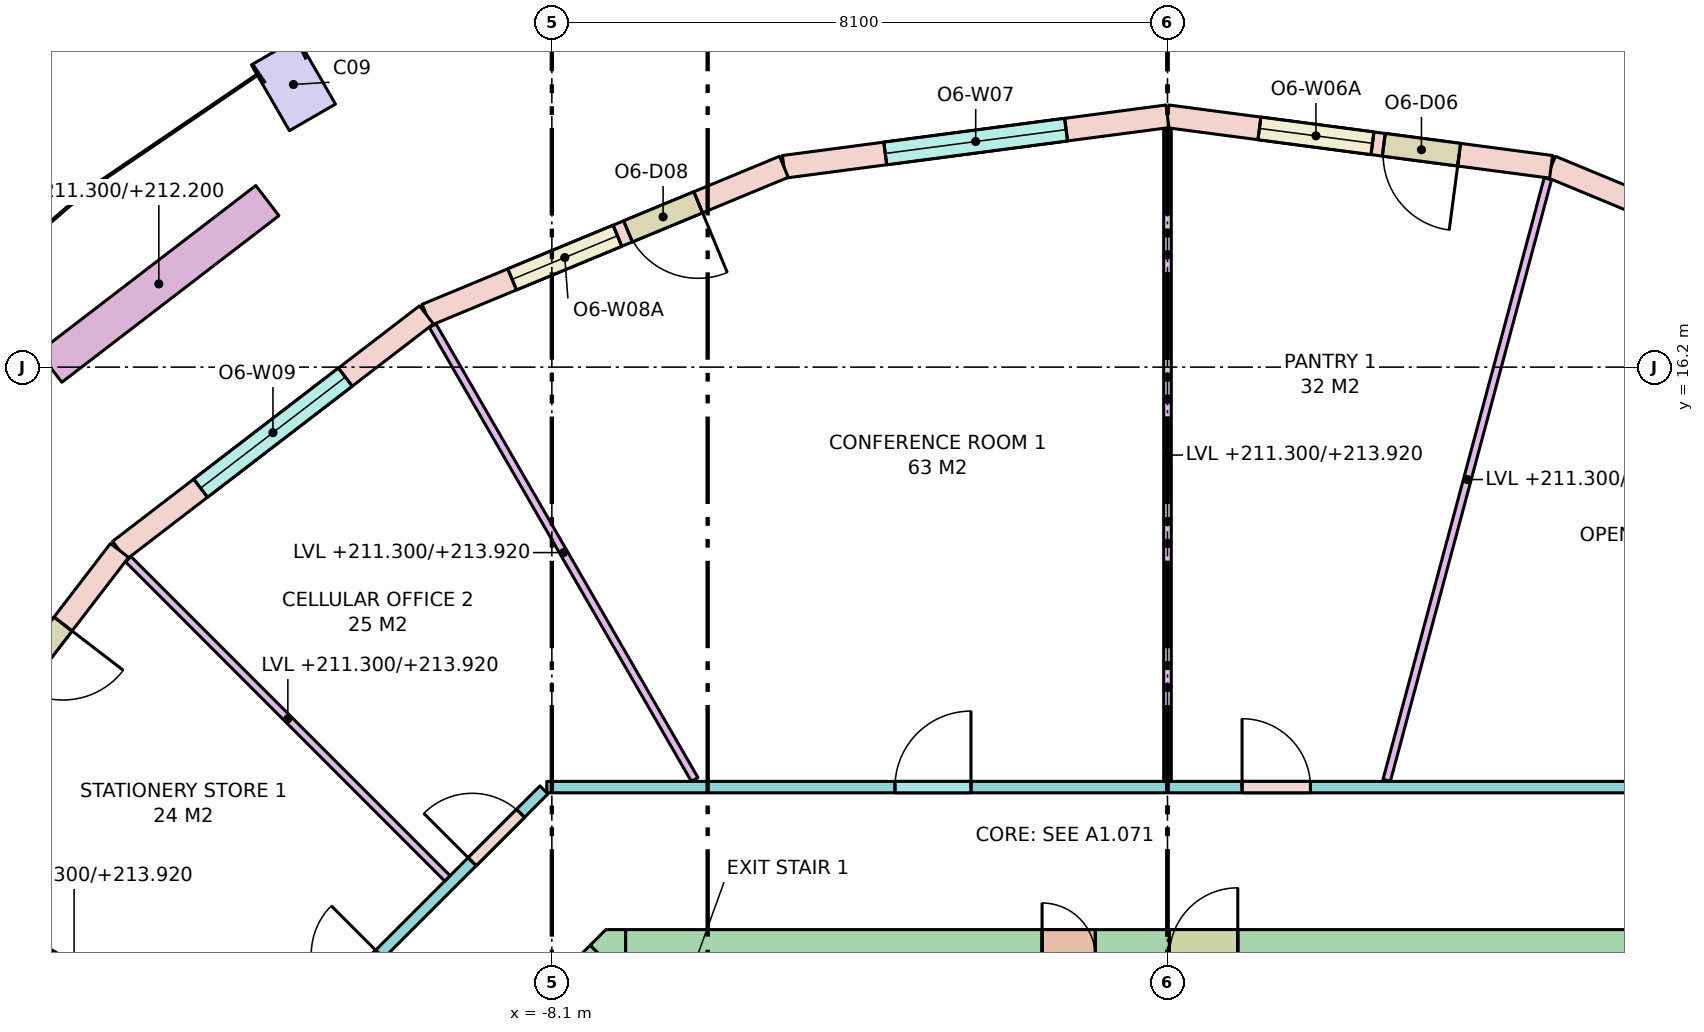
"""IFC4 building model, lengths in metres.
Left out: names, types, materials, properties, quantities, classifications, styles, units other than length and angle.
Written with IfcOpenShell. Run it as: python <this file> out.ifc"""

import sys

from ifc_helpers import new_model, si_unit, direction, frame, frame_2d, origin, origin_2d, place, context, subcontext, project, spatial, polyline, rectangle, outline, extrude, element, fill, save


model = new_model("IFC4")
c1 = context("Model", 3, precision=1e-05, world=origin(), true_north=direction((0.0, 1.0)))
c2 = subcontext(c1, "Body", "Model", "MODEL_VIEW")
j1 = project(units=[si_unit("LENGTHUNIT", "METRE"), si_unit("PLANEANGLEUNIT", "RADIAN")], contexts=[c1])
p1 = place(None, origin())
s1 = spatial("IfcSite", under=j1, at=p1, CompositionType="ELEMENT")
p2 = place(p1, origin())
s2 = spatial("IfcBuilding", under=s1, at=p2, CompositionType="ELEMENT")
p3 = place(p2, frame((0.0, 0.0, 211.3)))
s3 = spatial("IfcBuildingStorey", under=s2, at=p3, CompositionType="ELEMENT", Elevation=211.3)
p4 = place(p3, frame((-11.5, 19.919, 0.0), z_axis=(0.0, 0.0, 1.0), x_axis=(-0.866025403784, -0.5, 0.0)))
e1 = element("IfcColumn", 1, at=p4, inside=s3, PredefinedType="COLUMN", context=c2, shape_type="SweptSolid", body=[
    extrude(rectangle(XDim=0.7, YDim=1.0, at=origin_2d()), origin(), (0.0, 0.0, 1.0), 3.7),
])
p5 = place(p3, frame((-7.13, 8.45, -0.28), z_axis=(0.0, 0.0, 1.0), x_axis=(1.0, 0.0, 0.0)))
e2 = element("IfcWall", 2, at=p5, inside=s3, PredefinedType="SHEAR", context=c2, shape_type="SweptSolid", body=[
    extrude(rectangle(XDim=14.26, YDim=0.7, at=frame_2d((7.13, 0.0))), origin(), (0.0, 0.0, 1.0), 3.7),
])
p6 = place(p5, frame((5.48, 0.0, 0.28)))
e3 = element("IfcOpeningElement", 3, at=p6, cuts=e2, PredefinedType="OPENING", context=c2, shape_type="SweptSolid", body=[
    extrude(rectangle(XDim=0.7, YDim=2.1, at=frame_2d((0.35, 1.05))), frame((0.0, 0.36, 0.0), z_axis=(0.0, -1.0, 0.0), x_axis=(1.0, 0.0, 0.0)), (0.0, 0.0, 1.0), 0.72),
])
p7 = place(p5, frame((7.155, 0.0, 0.28)))
e4 = element("IfcOpeningElement", 4, at=p7, cuts=e2, PredefinedType="OPENING", context=c2, shape_type="SweptSolid", body=[
    extrude(rectangle(XDim=0.9, YDim=2.1, at=frame_2d((0.45, 1.05))), frame((0.0, 0.36, 0.0), z_axis=(0.0, -1.0, 0.0), x_axis=(1.0, 0.0, 0.0)), (0.0, 0.0, 1.0), 0.72),
])
p8 = place(p3, frame((-10.347, 5.347, -0.28), z_axis=(0.0, 0.0, 1.0), x_axis=(0.707106781187, 0.707106781187, 0.0)))
e5 = element("IfcWall", 5, at=p8, inside=s3, PredefinedType="SHEAR", context=c2, shape_type="SweptSolid", body=[
    extrude(rectangle(XDim=4.243, YDim=0.7, at=frame_2d((2.121, 0.0))), origin(), (0.0, 0.0, 1.0), 3.7),
])
p9 = place(p8, frame((0.65, 0.0, 0.28)))
e6 = element("IfcOpeningElement", 6, at=p9, cuts=e5, PredefinedType="OPENING", context=c2, shape_type="SweptSolid", body=[
    extrude(rectangle(XDim=1.2, YDim=2.1, at=frame_2d((0.6, 1.05))), frame((0.0, 0.36, 0.0), z_axis=(0.0, -1.0, 0.0), x_axis=(1.0, 0.0, 0.0)), (0.0, 0.0, 1.0), 0.72),
])
p10 = place(p3, frame((0.0, 0.0, -0.28)))
e7 = element("IfcWall", 7, at=p10, inside=s3, PredefinedType="SHEAR", context=c2, shape_type="SweptSolid", body=[
    extrude(outline(polyline([(-7.39, 8.8), (-7.13, 8.8), (-7.13, 8.8), (-7.13, 8.13), (-7.595, 8.595), (-7.595, 8.595), (-7.595, 8.595), (-7.39, 8.8)])), origin(), (0.0, 0.0, 1.0), 3.7),
])
p11 = place(p3, frame((9.75, 16.887, 0.0), z_axis=(0.0, 0.0, 1.0), x_axis=(-0.923862504675, 0.382724538613, 0.0)))
e8 = element("IfcWall", 8, at=p11, inside=s3, PredefinedType="STANDARD", context=c2, shape_type="SweptSolid", body=[
    extrude(rectangle(XDim=5.091, YDim=0.3, at=frame_2d((2.545, 0.0))), origin(), (0.0, 0.0, 1.0), 3.42),
])
p12 = place(p11, frame((1.345, 0.0, 0.8)))
e9 = element("IfcOpeningElement", 9, at=p12, cuts=e8, PredefinedType="OPENING", context=c2, shape_type="SweptSolid", body=[
    extrude(rectangle(XDim=2.4, YDim=2.4, at=frame_2d((1.2, 1.2))), frame((0.0, 0.16, 0.0), z_axis=(0.0, -1.0, 0.0), x_axis=(1.0, 0.0, 0.0)), (0.0, 0.0, 1.0), 0.32),
])
p13 = place(p3, frame((5.047, 18.836, 0.0), z_axis=(0.0, 0.0, 1.0), x_axis=(-0.99144890792, 0.130495451964, 0.0)))
e10 = element("IfcWall", 10, at=p13, inside=s3, PredefinedType="STANDARD", context=c2, shape_type="SweptSolid", body=[
    extrude(rectangle(XDim=5.091, YDim=0.3, at=frame_2d((2.545, 0.0))), origin(), (0.0, 0.0, 1.0), 3.42),
])
p14 = place(p13, frame((1.22, 0.0, 0.0)))
e11 = element("IfcOpeningElement", 11, at=p14, cuts=e10, PredefinedType="OPENING", context=c2, shape_type="SweptSolid", body=[
    extrude(rectangle(XDim=1.0, YDim=2.4, at=frame_2d((0.5, 1.2))), frame((0.0, 0.16, 0.0), z_axis=(0.0, -1.0, 0.0), x_axis=(1.0, 0.0, 0.0)), (0.0, 0.0, 1.0), 0.32),
])
p15 = place(p13, frame((2.37, 0.0, 0.8)))
e12 = element("IfcOpeningElement", 12, at=p15, cuts=e10, PredefinedType="OPENING", context=c2, shape_type="SweptSolid", body=[
    extrude(rectangle(XDim=1.5, YDim=2.4, at=frame_2d((0.75, 1.2))), frame((0.0, 0.16, 0.0), z_axis=(0.0, -1.0, 0.0), x_axis=(1.0, 0.0, 0.0)), (0.0, 0.0, 1.0), 0.32),
])
p16 = place(p3, frame((0.0, 19.5, 0.0), z_axis=(0.0, 0.0, 1.0), x_axis=(-0.99144890792, -0.130495451964, 0.0)))
e13 = element("IfcWall", 13, at=p16, inside=s3, PredefinedType="STANDARD", context=c2, shape_type="SweptSolid", body=[
    extrude(rectangle(XDim=5.091, YDim=0.3, at=frame_2d((2.545, 0.0))), origin(), (0.0, 0.0, 1.0), 3.42),
])
p17 = place(p16, frame((1.345, 0.0, 0.8)))
e14 = element("IfcOpeningElement", 14, at=p17, cuts=e13, PredefinedType="OPENING", context=c2, shape_type="SweptSolid", body=[
    extrude(rectangle(XDim=2.4, YDim=2.4, at=frame_2d((1.2, 1.2))), frame((0.0, 0.16, 0.0), z_axis=(0.0, -1.0, 0.0), x_axis=(1.0, 0.0, 0.0)), (0.0, 0.0, 1.0), 0.32),
])
p18 = place(p3, frame((-5.047, 18.836, 0.0), z_axis=(0.0, 0.0, 1.0), x_axis=(-0.923862504675, -0.382724538613, 0.0)))
e15 = element("IfcWall", 15, at=p18, inside=s3, PredefinedType="STANDARD", context=c2, shape_type="SweptSolid", body=[
    extrude(rectangle(XDim=5.091, YDim=0.3, at=frame_2d((2.545, 0.0))), origin(), (0.0, 0.0, 1.0), 3.42),
])
p19 = place(p18, frame((1.22, 0.0, 0.0)))
e16 = element("IfcOpeningElement", 16, at=p19, cuts=e15, PredefinedType="OPENING", context=c2, shape_type="SweptSolid", body=[
    extrude(rectangle(XDim=1.0, YDim=2.4, at=frame_2d((0.5, 1.2))), frame((0.0, 0.16, 0.0), z_axis=(0.0, -1.0, 0.0), x_axis=(1.0, 0.0, 0.0)), (0.0, 0.0, 1.0), 0.32),
])
p20 = place(p18, frame((2.37, 0.0, 0.8)))
e17 = element("IfcOpeningElement", 17, at=p20, cuts=e15, PredefinedType="OPENING", context=c2, shape_type="SweptSolid", body=[
    extrude(rectangle(XDim=1.5, YDim=2.4, at=frame_2d((0.75, 1.2))), frame((0.0, 0.16, 0.0), z_axis=(0.0, -1.0, 0.0), x_axis=(1.0, 0.0, 0.0)), (0.0, 0.0, 1.0), 0.32),
])
p21 = place(p3, frame((-9.75, 16.887, 0.0), z_axis=(0.0, 0.0, 1.0), x_axis=(-0.79335619014, -0.608757714995, 0.0)))
e18 = element("IfcWall", 18, at=p21, inside=s3, PredefinedType="STANDARD", context=c2, shape_type="SweptSolid", body=[
    extrude(rectangle(XDim=5.091, YDim=0.3, at=frame_2d((2.545, 0.0))), origin(), (0.0, 0.0, 1.0), 3.42),
])
p22 = place(p21, frame((1.345, 0.0, 0.8)))
e19 = element("IfcOpeningElement", 19, at=p22, cuts=e18, PredefinedType="OPENING", context=c2, shape_type="SweptSolid", body=[
    extrude(rectangle(XDim=2.4, YDim=2.4, at=frame_2d((1.2, 1.2))), frame((0.0, 0.16, 0.0), z_axis=(0.0, -1.0, 0.0), x_axis=(1.0, 0.0, 0.0)), (0.0, 0.0, 1.0), 0.32),
])
p23 = place(p3, frame((-13.789, 13.789, 0.0), z_axis=(0.0, 0.0, 1.0), x_axis=(-0.608757714995, -0.79335619014, 0.0)))
e20 = element("IfcWall", 20, at=p23, inside=s3, PredefinedType="STANDARD", context=c2, shape_type="SweptSolid", body=[
    extrude(rectangle(XDim=5.091, YDim=0.3, at=frame_2d((2.545, 0.0))), origin(), (0.0, 0.0, 1.0), 3.42),
])
p24 = place(p23, frame((1.22, 0.0, 0.0)))
e21 = element("IfcOpeningElement", 21, at=p24, cuts=e20, PredefinedType="OPENING", context=c2, shape_type="SweptSolid", body=[
    extrude(rectangle(XDim=1.0, YDim=2.4, at=frame_2d((0.5, 1.2))), frame((0.0, 0.16, 0.0), z_axis=(0.0, -1.0, 0.0), x_axis=(1.0, 0.0, 0.0)), (0.0, 0.0, 1.0), 0.32),
])
p25 = place(p23, frame((2.37, 0.0, 0.8)))
e22 = element("IfcOpeningElement", 22, at=p25, cuts=e20, PredefinedType="OPENING", context=c2, shape_type="SweptSolid", body=[
    extrude(rectangle(XDim=1.5, YDim=2.4, at=frame_2d((0.75, 1.2))), frame((0.0, 0.16, 0.0), z_axis=(0.0, -1.0, 0.0), x_axis=(1.0, 0.0, 0.0)), (0.0, 0.0, 1.0), 0.32),
])
p26 = place(p3, frame((-11.843, 18.391, 0.0), z_axis=(0.0, 0.0, 1.0), x_axis=(-0.793326845617, -0.608795955984, 0.0)))
e23 = element("IfcWall", 23, at=p26, inside=s3, PredefinedType="PARAPET", context=c2, shape_type="SweptSolid", body=[
    extrude(rectangle(XDim=3.6, YDim=0.5, at=frame_2d((1.8, 0.0))), origin(), (0.0, 0.0, 1.0), 0.9),
])
p27 = place(p3, frame((-12.638, 6.204, 0.0), z_axis=(0.0, 0.0, 1.0), x_axis=(0.707106781187, 0.707106781187, 0.0)))
e24 = element("IfcWall", 24, at=p27, inside=s3, PredefinedType="PARTITIONING", context=c2, shape_type="SweptSolid", body=[
    extrude(rectangle(XDim=6.271, YDim=0.15, at=frame_2d((3.135, 0.0))), origin(), (0.0, 0.0, 1.0), 2.62),
])
p28 = place(p27, frame((4.935, 0.0, 0.0)))
e25 = element("IfcOpeningElement", 25, at=p28, cuts=e24, PredefinedType="OPENING", context=c2, shape_type="SweptSolid", body=[
    extrude(rectangle(XDim=0.9, YDim=2.1, at=frame_2d((0.45, 1.05))), frame((0.0, 0.085, 0.0), z_axis=(0.0, -1.0, 0.0), x_axis=(1.0, 0.0, 0.0)), (0.0, 0.0, 1.0), 0.17),
])
p29 = place(p27, frame((2.314, 0.0, 0.0)))
e26 = element("IfcOpeningElement", 26, at=p29, cuts=e24, PredefinedType="OPENING", context=c2, shape_type="SweptSolid", body=[
    extrude(rectangle(XDim=0.9, YDim=2.1, at=frame_2d((0.45, 1.05))), frame((0.0, 0.085, 0.0), z_axis=(0.0, -1.0, 0.0), x_axis=(1.0, 0.0, 0.0)), (0.0, 0.0, 1.0), 0.17),
])
p30 = place(p3, frame((-8.167, 10.675, 0.0), z_axis=(0.0, 0.0, 1.0), x_axis=(1.0, 0.0, 0.0)))
e27 = element("IfcWall", 27, at=p30, inside=s3, PredefinedType="PARTITIONING", context=c2, shape_type="SweptSolid", body=[
    extrude(rectangle(XDim=16.333, YDim=0.15, at=frame_2d((8.167, 0.0))), origin(), (0.0, 0.0, 1.0), 2.62),
])
p31 = place(p30, frame((9.148, 0.0, 0.0)))
e28 = element("IfcOpeningElement", 28, at=p31, cuts=e27, PredefinedType="OPENING", context=c2, shape_type="SweptSolid", body=[
    extrude(rectangle(XDim=0.9, YDim=2.1, at=frame_2d((0.45, 1.05))), frame((0.0, 0.085, 0.0), z_axis=(0.0, -1.0, 0.0), x_axis=(1.0, 0.0, 0.0)), (0.0, 0.0, 1.0), 0.17),
])
p32 = place(p30, frame((4.581, 0.0, 0.0)))
e29 = element("IfcOpeningElement", 29, at=p32, cuts=e27, PredefinedType="OPENING", context=c2, shape_type="SweptSolid", body=[
    extrude(rectangle(XDim=1.0, YDim=2.1, at=frame_2d((0.5, 1.05))), frame((0.0, 0.085, 0.0), z_axis=(0.0, -1.0, 0.0), x_axis=(1.0, 0.0, 0.0)), (0.0, 0.0, 1.0), 0.17),
])
p33 = place(p3, frame((2.884, 10.764, 0.0), z_axis=(0.0, 0.0, 1.0), x_axis=(0.258818011497, 0.965926103242, 0.0)))
e30 = element("IfcWall", 30, at=p33, inside=s3, PredefinedType="PARTITIONING", context=c2, shape_type="SweptSolid", body=[
    extrude(rectangle(XDim=8.192, YDim=0.1, at=frame_2d((4.096, 0.0))), origin(), (0.0, 0.0, 1.0), 2.62),
])
p34 = place(p3, frame((0.0, 10.75, 0.0), z_axis=(0.0, 0.0, 1.0), x_axis=(0.0, 1.0, 0.0)))
e31 = element("IfcWall", 31, at=p34, inside=s3, PredefinedType="PARTITIONING", context=c2, shape_type="SweptSolid", body=[
    extrude(rectangle(XDim=8.587, YDim=0.1, at=frame_2d((4.293, 0.0))), origin(), (0.0, 0.0, 1.0), 2.62),
])
p35 = place(p3, frame((-6.221, 10.775, 0.0), z_axis=(0.0, 0.0, 1.0), x_axis=(-0.500015661236, 0.866016361577, 0.0)))
e32 = element("IfcWall", 32, at=p35, inside=s3, PredefinedType="PARTITIONING", context=c2, shape_type="SweptSolid", body=[
    extrude(rectangle(XDim=6.895, YDim=0.1, at=frame_2d((3.448, 0.0))), origin(), (0.0, 0.0, 1.0), 2.62),
])
p36 = place(p3, frame((-9.474, 9.474, 0.0), z_axis=(0.0, 0.0, 1.0), x_axis=(-0.707106781187, 0.707106781187, 0.0)))
e33 = element("IfcWall", 33, at=p36, inside=s3, PredefinedType="PARTITIONING", context=c2, shape_type="SweptSolid", body=[
    extrude(rectangle(XDim=5.938, YDim=0.1, at=frame_2d((2.969, 0.0))), origin(), (0.0, 0.0, 1.0), 2.62),
])
p37 = place(p3, frame((-12.025, 6.943, 0.0), z_axis=(0.0, 0.0, 1.0), x_axis=(-0.866029712004, 0.499992537871, 0.0)))
e34 = element("IfcWall", 34, at=p37, inside=s3, PredefinedType="PARTITIONING", context=c2, shape_type="SweptSolid", body=[
    extrude(rectangle(XDim=5.451, YDim=0.1, at=frame_2d((2.726, 0.0))), origin(), (0.0, 0.0, 1.0), 2.62),
])
p38 = place(p14, origin())
e35 = element("IfcDoor", 35, at=p38, inside=s3, OperationType="SINGLE_SWING_LEFT", PredefinedType="DOOR", context=c2, shape_type="SweptSolid", body=[
    extrude(rectangle(XDim=1.0, YDim=2.4, at=frame_2d((0.5, 1.2))), frame((0.0, 0.025, 0.0), z_axis=(0.0, -1.0, 0.0), x_axis=(1.0, 0.0, 0.0)), (0.0, 0.0, 1.0), 0.05),
])
fill(e11, e35)
p39 = place(p15, origin())
e36 = element("IfcWindow", 36, at=p39, inside=s3, PartitioningType="SINGLE_PANEL", PredefinedType="WINDOW", context=c2, shape_type="SweptSolid", body=[
    extrude(rectangle(XDim=1.5, YDim=2.4, at=frame_2d((0.75, 1.2))), frame((0.0, 0.03, 0.0), z_axis=(0.0, -1.0, 0.0), x_axis=(1.0, 0.0, 0.0)), (0.0, 0.0, 1.0), 0.06),
])
fill(e12, e36)
p40 = place(p17, origin())
e37 = element("IfcWindow", 37, at=p40, inside=s3, PartitioningType="SINGLE_PANEL", PredefinedType="WINDOW", context=c2, shape_type="SweptSolid", body=[
    extrude(rectangle(XDim=2.4, YDim=2.4, at=frame_2d((1.2, 1.2))), frame((0.0, 0.03, 0.0), z_axis=(0.0, -1.0, 0.0), x_axis=(1.0, 0.0, 0.0)), (0.0, 0.0, 1.0), 0.06),
])
fill(e14, e37)
p41 = place(p19, origin())
e38 = element("IfcDoor", 38, at=p41, inside=s3, OperationType="SINGLE_SWING_LEFT", PredefinedType="DOOR", context=c2, shape_type="SweptSolid", body=[
    extrude(rectangle(XDim=1.0, YDim=2.4, at=frame_2d((0.5, 1.2))), frame((0.0, 0.025, 0.0), z_axis=(0.0, -1.0, 0.0), x_axis=(1.0, 0.0, 0.0)), (0.0, 0.0, 1.0), 0.05),
])
fill(e16, e38)
p42 = place(p20, origin())
e39 = element("IfcWindow", 39, at=p42, inside=s3, PartitioningType="SINGLE_PANEL", PredefinedType="WINDOW", context=c2, shape_type="SweptSolid", body=[
    extrude(rectangle(XDim=1.5, YDim=2.4, at=frame_2d((0.75, 1.2))), frame((0.0, 0.03, 0.0), z_axis=(0.0, -1.0, 0.0), x_axis=(1.0, 0.0, 0.0)), (0.0, 0.0, 1.0), 0.06),
])
fill(e17, e39)
p43 = place(p22, origin())
e40 = element("IfcWindow", 40, at=p43, inside=s3, PartitioningType="SINGLE_PANEL", PredefinedType="WINDOW", context=c2, shape_type="SweptSolid", body=[
    extrude(rectangle(XDim=2.4, YDim=2.4, at=frame_2d((1.2, 1.2))), frame((0.0, 0.03, 0.0), z_axis=(0.0, -1.0, 0.0), x_axis=(1.0, 0.0, 0.0)), (0.0, 0.0, 1.0), 0.06),
])
fill(e19, e40)
p44 = place(p24, origin())
e41 = element("IfcDoor", 41, at=p44, inside=s3, OperationType="SINGLE_SWING_LEFT", PredefinedType="DOOR", context=c2, shape_type="SweptSolid", body=[
    extrude(rectangle(XDim=1.0, YDim=2.4, at=frame_2d((0.5, 1.2))), frame((0.0, 0.025, 0.0), z_axis=(0.0, -1.0, 0.0), x_axis=(1.0, 0.0, 0.0)), (0.0, 0.0, 1.0), 0.05),
])
fill(e21, e41)
p45 = place(p31, origin())
e42 = element("IfcDoor", 42, at=p45, inside=s3, OperationType="SINGLE_SWING_LEFT", PredefinedType="DOOR", context=c2, shape_type="SweptSolid", body=[
    extrude(rectangle(XDim=0.9, YDim=2.1, at=frame_2d((0.45, 1.05))), frame((0.0, 0.025, 0.0), z_axis=(0.0, -1.0, 0.0), x_axis=(1.0, 0.0, 0.0)), (0.0, 0.0, 1.0), 0.05),
])
fill(e28, e42)
p46 = place(p32, origin())
e43 = element("IfcDoor", 43, at=p46, inside=s3, OperationType="SINGLE_SWING_RIGHT", PredefinedType="DOOR", context=c2, shape_type="SweptSolid", body=[
    extrude(rectangle(XDim=1.0, YDim=2.1, at=frame_2d((0.5, 1.05))), frame((0.0, 0.025, 0.0), z_axis=(0.0, -1.0, 0.0), x_axis=(1.0, 0.0, 0.0)), (0.0, 0.0, 1.0), 0.05),
])
fill(e29, e43)
p47 = place(p28, origin())
e44 = element("IfcDoor", 44, at=p47, inside=s3, OperationType="SINGLE_SWING_LEFT", PredefinedType="DOOR", context=c2, shape_type="SweptSolid", body=[
    extrude(rectangle(XDim=0.9, YDim=2.1, at=frame_2d((0.45, 1.05))), frame((0.0, 0.025, 0.0), z_axis=(0.0, -1.0, 0.0), x_axis=(1.0, 0.0, 0.0)), (0.0, 0.0, 1.0), 0.05),
])
fill(e25, e44)
save(model, sys.argv[1])
